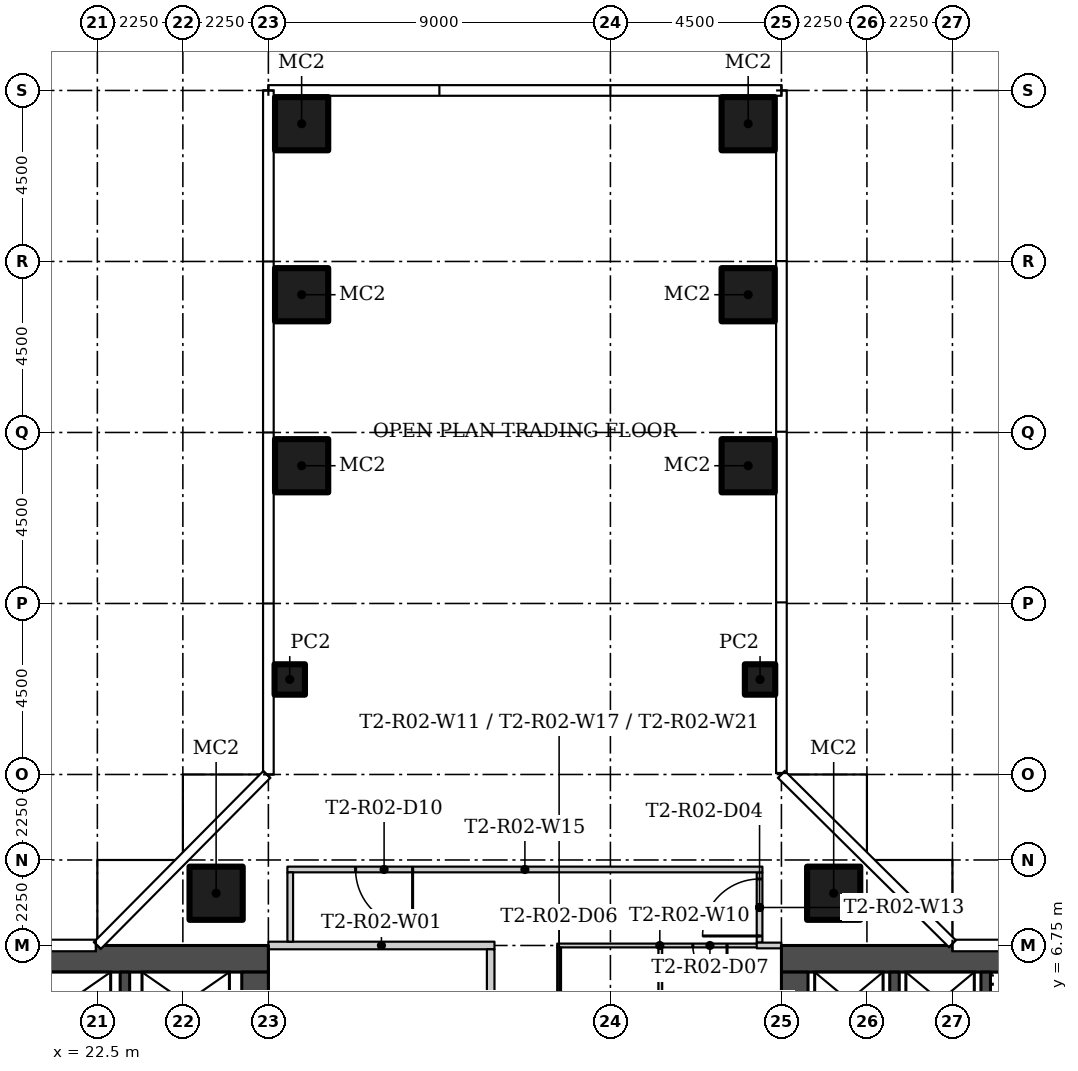
"""IFC4 building model, lengths in metres.
Left out: names, types, materials, properties, quantities, classifications, styles, units other than length and angle.
Written with IfcOpenShell. Run it as: python <this file> out.ifc"""

import sys

from ifc_helpers import new_model, si_unit, direction, frame, frame_2d, origin, origin_2d, place, context, subcontext, project, spatial, rectangle, hollow_rectangle, extrude, element, fill, save


model = new_model("IFC4")
c1 = context("Model", 3, precision=1e-05, world=origin(), true_north=direction((0.0, 1.0)))
c2 = subcontext(c1, "Body", "Model", "MODEL_VIEW")
j1 = project(units=[si_unit("LENGTHUNIT", "METRE"), si_unit("PLANEANGLEUNIT", "RADIAN")], contexts=[c1])
p1 = place(None, origin())
s1 = spatial("IfcSite", under=j1, at=p1, CompositionType="ELEMENT")
p2 = place(p1, origin())
s2 = spatial("IfcBuilding", under=s1, at=p2, CompositionType="ELEMENT")
p3 = place(p2, frame((0.0, 0.0, 33.0)))
s3 = spatial("IfcBuildingStorey", under=s2, at=p3, CompositionType="ELEMENT", Elevation=33.0)
for number, where in (
    (1, (25.625, 8.125, 0.0)),
    (2, (41.875, 8.125, 0.0)),
):
    element("IfcColumn", number, at=place(p3, frame(where)), inside=s3, PredefinedType="COLUMN", context=c2, shape_type="SweptSolid", body=[
        extrude(hollow_rectangle(XDim=1.4, YDim=1.4, WallThickness=0.05, at=origin_2d()), origin(), (0.0, 0.0, 1.0), 4.15),
    ])
p4 = place(p3, frame((39.938, 13.75, 0.0)))
e3 = element("IfcColumn", 3, at=p4, inside=s3, PredefinedType="COLUMN", context=c2, shape_type="SweptSolid", body=[
    extrude(hollow_rectangle(XDim=0.8, YDim=0.8, WallThickness=0.025, at=origin_2d()), origin(), (0.0, 0.0, 1.0), 4.15),
])
for number, where in (
    (4, (39.625, 19.375, 0.0)),
    (5, (39.625, 23.875, 0.0)),
    (6, (39.625, 28.375, 0.0)),
):
    element("IfcColumn", number, at=place(p3, frame(where)), inside=s3, PredefinedType="COLUMN", context=c2, shape_type="SweptSolid", body=[
        extrude(hollow_rectangle(XDim=1.4, YDim=1.4, WallThickness=0.05, at=origin_2d()), origin(), (0.0, 0.0, 1.0), 4.15),
    ])
p5 = place(p3, frame((27.562, 13.75, 0.0)))
e7 = element("IfcColumn", 7, at=p5, inside=s3, PredefinedType="COLUMN", context=c2, shape_type="SweptSolid", body=[
    extrude(hollow_rectangle(XDim=0.8, YDim=0.8, WallThickness=0.025, at=origin_2d()), origin(), (0.0, 0.0, 1.0), 4.15),
])
for number, where in (
    (8, (27.875, 19.375, 0.0)),
    (9, (27.875, 23.875, 0.0)),
    (10, (27.875, 28.375, 0.0)),
):
    element("IfcColumn", number, at=place(p3, frame(where)), inside=s3, PredefinedType="COLUMN", context=c2, shape_type="SweptSolid", body=[
        extrude(hollow_rectangle(XDim=1.4, YDim=1.4, WallThickness=0.05, at=origin_2d()), origin(), (0.0, 0.0, 1.0), 4.15),
    ])
p6 = place(p3, frame((32.95, 6.75, 0.0), z_axis=(0.0, 0.0, 1.0), x_axis=(-1.0, 0.0, 0.0)))
e11 = element("IfcWall", 11, at=p6, inside=s3, PredefinedType="PARTITIONING", context=c2, shape_type="SweptSolid", body=[
    extrude(rectangle(XDim=5.95, YDim=0.2, at=frame_2d((2.975, 0.0))), origin(), (0.0, 0.0, 1.0), 4.15),
])
p7 = place(p3, frame((32.85, 2.55, 0.0), z_axis=(0.0, 0.0, 1.0), x_axis=(0.0, 1.0, 0.0)))
e12 = element("IfcWall", 12, at=p7, inside=s3, PredefinedType="PARTITIONING", context=c2, shape_type="SweptSolid", body=[
    extrude(rectangle(XDim=4.1, YDim=0.2, at=frame_2d((2.05, 0.0))), origin(), (0.0, 0.0, 1.0), 4.15),
])
p8 = place(p7, frame((1.55, 0.0, 0.0)))
e13 = element("IfcOpeningElement", 13, at=p8, cuts=e12, PredefinedType="OPENING", context=c2, shape_type="SweptSolid", body=[
    extrude(rectangle(XDim=1.0, YDim=2.1, at=frame_2d((0.5, 1.05))), frame((0.0, 0.11, 0.0), z_axis=(0.0, -1.0, 0.0), x_axis=(1.0, 0.0, 0.0)), (0.0, 0.0, 1.0), 0.22),
])
p9 = place(p3, frame((40.0, 6.75, 0.0), z_axis=(0.0, 0.0, 1.0), x_axis=(-1.0, 0.0, 0.0)))
e14 = element("IfcWall", 14, at=p9, inside=s3, PredefinedType="PARTITIONING", context=c2, shape_type="SweptSolid", body=[
    extrude(rectangle(XDim=5.399, YDim=0.1, at=frame_2d((2.7, 0.0))), origin(), (0.0, 0.0, 1.0), 4.15),
])
p10 = place(p9, frame((0.931, 0.0, 0.0)))
e15 = element("IfcOpeningElement", 15, at=p10, cuts=e14, PredefinedType="OPENING", context=c2, shape_type="SweptSolid", body=[
    extrude(rectangle(XDim=0.9, YDim=2.1, at=frame_2d((0.45, 1.05))), frame((0.0, 0.06, 0.0), z_axis=(0.0, -1.0, 0.0), x_axis=(1.0, 0.0, 0.0)), (0.0, 0.0, 1.0), 0.12),
])
p11 = place(p3, frame((34.65, 6.7, 0.0), z_axis=(0.0, 0.0, 1.0), x_axis=(0.0, -1.0, 0.0)))
e16 = element("IfcWall", 16, at=p11, inside=s3, PredefinedType="PARTITIONING", context=c2, shape_type="SweptSolid", body=[
    extrude(rectangle(XDim=4.2, YDim=0.1, at=frame_2d((2.1, 0.0))), origin(), (0.0, 0.0, 1.0), 4.15),
])
p12 = place(p11, frame((1.65, 0.0, 0.0)))
e17 = element("IfcOpeningElement", 17, at=p12, cuts=e16, PredefinedType="OPENING", context=c2, shape_type="SweptSolid", body=[
    extrude(rectangle(XDim=0.9, YDim=2.1, at=frame_2d((0.45, 1.05))), frame((0.0, 0.06, 0.0), z_axis=(0.0, -1.0, 0.0), x_axis=(1.0, 0.0, 0.0)), (0.0, 0.0, 1.0), 0.12),
])
p13 = place(p3, frame((39.925, 6.825, 0.0), z_axis=(0.0, 0.0, 1.0), x_axis=(0.0, 1.0, 0.0)))
e18 = element("IfcWall", 18, at=p13, inside=s3, PredefinedType="PARTITIONING", context=c2, shape_type="SweptSolid", body=[
    extrude(rectangle(XDim=1.85, YDim=0.15, at=frame_2d((0.925, 0.0))), origin(), (0.0, 0.0, 1.0), 4.15),
])
p14 = place(p13, frame((0.175, 0.0, 0.0)))
e19 = element("IfcOpeningElement", 19, at=p14, cuts=e18, PredefinedType="OPENING", context=c2, shape_type="SweptSolid", body=[
    extrude(rectangle(XDim=1.5, YDim=2.4, at=frame_2d((0.75, 1.2))), frame((0.0, 0.085, 0.0), z_axis=(0.0, -1.0, 0.0), x_axis=(1.0, 0.0, 0.0)), (0.0, 0.0, 1.0), 0.17),
])
p15 = place(p3, frame((40.0, 8.75, 0.0), z_axis=(0.0, 0.0, 1.0), x_axis=(-1.0, 0.0, 0.0)))
e20 = element("IfcWall", 20, at=p15, inside=s3, PredefinedType="PARTITIONING", context=c2, shape_type="SweptSolid", body=[
    extrude(rectangle(XDim=12.5, YDim=0.15, at=frame_2d((6.25, 0.0))), origin(), (0.0, 0.0, 1.0), 4.15),
])
p16 = place(p15, frame((9.205, 0.0, 0.0)))
e21 = element("IfcOpeningElement", 21, at=p16, cuts=e20, PredefinedType="OPENING", context=c2, shape_type="SweptSolid", body=[
    extrude(rectangle(XDim=1.5, YDim=2.4, at=frame_2d((0.75, 1.2))), frame((0.0, 0.085, 0.0), z_axis=(0.0, -1.0, 0.0), x_axis=(1.0, 0.0, 0.0)), (0.0, 0.0, 1.0), 0.17),
])
p17 = place(p3, frame((27.575, 8.675, 0.0), z_axis=(0.0, 0.0, 1.0), x_axis=(0.0, -1.0, 0.0)))
e22 = element("IfcWall", 22, at=p17, inside=s3, PredefinedType="PARTITIONING", context=c2, shape_type="SweptSolid", body=[
    extrude(rectangle(XDim=1.825, YDim=0.15, at=frame_2d((0.913, 0.0))), origin(), (0.0, 0.0, 1.0), 4.15),
])
p18 = place(p3, frame((37.312, 6.7, 0.0), z_axis=(0.0, 0.0, 1.0), x_axis=(0.0, -1.0, 0.0)))
e23 = element("IfcWall", 23, at=p18, inside=s3, PredefinedType="PARTITIONING", context=c2, shape_type="SweptSolid", body=[
    extrude(rectangle(XDim=4.2, YDim=0.1, at=frame_2d((2.1, 0.0))), origin(), (0.0, 0.0, 1.0), 4.15),
])
p19 = place(p3, frame((40.5, 6.75, 0.0), z_axis=(0.0, 0.0, 1.0), x_axis=(-1.0, 0.0, 0.0)))
e24 = element("IfcWall", 24, at=p19, inside=s3, PredefinedType="PARTITIONING", context=c2, shape_type="SweptSolid", body=[
    extrude(rectangle(XDim=0.65, YDim=0.15, at=frame_2d((0.325, 0.0))), origin(), (0.0, 0.0, 1.0), 4.15),
])
p20 = place(p3, frame((13.5, 6.4, 0.0)))
e25 = element("IfcWall", 25, at=p20, inside=s3, PredefinedType="SHEAR", context=c2, shape_type="SweptSolid", body=[
    extrude(rectangle(XDim=13.5, YDim=0.7, at=frame_2d((6.75, 0.0))), origin(), (0.0, 0.0, 1.0), 4.15),
])
p21 = place(p3, frame((26.65, 6.05, 0.0), z_axis=(0.0, 0.0, 1.0), x_axis=(0.0, -1.0, 0.0)))
e26 = element("IfcWall", 26, at=p21, inside=s3, PredefinedType="SHEAR", context=c2, shape_type="SweptSolid", body=[
    extrude(rectangle(XDim=12.1, YDim=0.7, at=frame_2d((6.05, 0.0))), origin(), (0.0, 0.0, 1.0), 4.15),
])
p22 = place(p21, frame((10.1, 0.0, 0.0)))
e27 = element("IfcOpeningElement", 27, at=p22, cuts=e26, PredefinedType="OPENING", context=c2, shape_type="SweptSolid", body=[
    extrude(rectangle(XDim=1.2, YDim=2.1, at=frame_2d((0.6, 1.05))), frame((0.0, 0.36, 0.0), z_axis=(0.0, -1.0, 0.0), x_axis=(1.0, 0.0, 0.0)), (0.0, 0.0, 1.0), 0.72),
])
p23 = place(p21, frame((3.9, 0.0, 0.0)))
e28 = element("IfcOpeningElement", 28, at=p23, cuts=e26, PredefinedType="OPENING", context=c2, shape_type="SweptSolid", body=[
    extrude(rectangle(XDim=1.8, YDim=2.4, at=frame_2d((0.9, 1.2))), frame((0.0, 0.36, 0.0), z_axis=(0.0, -1.0, 0.0), x_axis=(1.0, 0.0, 0.0)), (0.0, 0.0, 1.0), 0.72),
])
p24 = place(p3, frame((23.225, 3.25, 0.0), z_axis=(0.0, 0.0, 1.0), x_axis=(0.0, 1.0, 0.0)))
e29 = element("IfcWall", 29, at=p24, inside=s3, PredefinedType="SHEAR", context=c2, shape_type="SweptSolid", body=[
    extrude(rectangle(XDim=2.8, YDim=0.25, at=frame_2d((1.4, 0.0))), origin(), (0.0, 0.0, 1.0), 4.15),
])
p25 = place(p3, frame((54.0, 6.4, 0.0), z_axis=(0.0, 0.0, 1.0), x_axis=(-1.0, 0.0, 0.0)))
e30 = element("IfcWall", 30, at=p25, inside=s3, PredefinedType="SHEAR", context=c2, shape_type="SweptSolid", body=[
    extrude(rectangle(XDim=13.5, YDim=0.7, at=frame_2d((6.75, 0.0))), origin(), (0.0, 0.0, 1.0), 4.15),
])
p26 = place(p3, frame((40.85, -6.05, 0.0), z_axis=(0.0, 0.0, 1.0), x_axis=(0.0, 1.0, 0.0)))
e31 = element("IfcWall", 31, at=p26, inside=s3, PredefinedType="SHEAR", context=c2, shape_type="SweptSolid", body=[
    extrude(rectangle(XDim=12.1, YDim=0.7, at=frame_2d((6.05, 0.0))), origin(), (0.0, 0.0, 1.0), 4.15),
])
p27 = place(p26, frame((0.8, 0.0, 0.0)))
e32 = element("IfcOpeningElement", 32, at=p27, cuts=e31, PredefinedType="OPENING", context=c2, shape_type="SweptSolid", body=[
    extrude(rectangle(XDim=1.2, YDim=2.1, at=frame_2d((0.6, 1.05))), frame((0.0, 0.36, 0.0), z_axis=(0.0, -1.0, 0.0), x_axis=(1.0, 0.0, 0.0)), (0.0, 0.0, 1.0), 0.72),
])
p28 = place(p26, frame((6.4, 0.0, 0.0)))
e33 = element("IfcOpeningElement", 33, at=p28, cuts=e31, PredefinedType="OPENING", context=c2, shape_type="SweptSolid", body=[
    extrude(rectangle(XDim=1.8, YDim=2.4, at=frame_2d((0.9, 1.2))), frame((0.0, 0.36, 0.0), z_axis=(0.0, -1.0, 0.0), x_axis=(1.0, 0.0, 0.0)), (0.0, 0.0, 1.0), 0.72),
])
for number, where, z_axis, x_axis in (
    (34, (45.875, 3.25, 0.0), (0.0, 0.0, 1.0), (0.0, 1.0, 0.0)),
    (35, (43.475, 3.25, 0.0), (0.0, 0.0, 1.0), (0.0, 1.0, 0.0)),
):
    element("IfcWall", number, at=place(p3, frame(where, z_axis=z_axis, x_axis=x_axis)), inside=s3, PredefinedType="SHEAR", context=c2, shape_type="SweptSolid", body=[
        extrude(rectangle(XDim=2.8, YDim=0.25, at=frame_2d((1.4, 0.0))), origin(), (0.0, 0.0, 1.0), 4.15),
    ])
p29 = place(p14, origin())
e36 = element("IfcDoor", 36, at=p29, inside=s3, OperationType="DOUBLE_DOOR_SINGLE_SWING", PredefinedType="DOOR", context=c2, shape_type="SweptSolid", body=[
    extrude(rectangle(XDim=1.5, YDim=2.4, at=frame_2d((0.75, 1.2))), frame((0.0, 0.025, 0.0), z_axis=(0.0, -1.0, 0.0), x_axis=(1.0, 0.0, 0.0)), (0.0, 0.0, 1.0), 0.05),
])
fill(e19, e36)
p30 = place(p10, origin())
e37 = element("IfcDoor", 37, at=p30, inside=s3, OperationType="SINGLE_SWING_RIGHT", PredefinedType="DOOR", context=c2, shape_type="SweptSolid", body=[
    extrude(rectangle(XDim=0.9, YDim=2.1, at=frame_2d((0.45, 1.05))), frame((0.0, 0.025, 0.0), z_axis=(0.0, -1.0, 0.0), x_axis=(1.0, 0.0, 0.0)), (0.0, 0.0, 1.0), 0.05),
])
fill(e15, e37)
p31 = place(p16, origin())
e38 = element("IfcDoor", 38, at=p31, inside=s3, OperationType="DOUBLE_DOOR_SINGLE_SWING", PredefinedType="DOOR", context=c2, shape_type="SweptSolid", body=[
    extrude(rectangle(XDim=1.5, YDim=2.4, at=frame_2d((0.75, 1.2))), frame((0.0, 0.025, 0.0), z_axis=(0.0, -1.0, 0.0), x_axis=(1.0, 0.0, 0.0)), (0.0, 0.0, 1.0), 0.05),
])
fill(e21, e38)
save(model, sys.argv[1])
